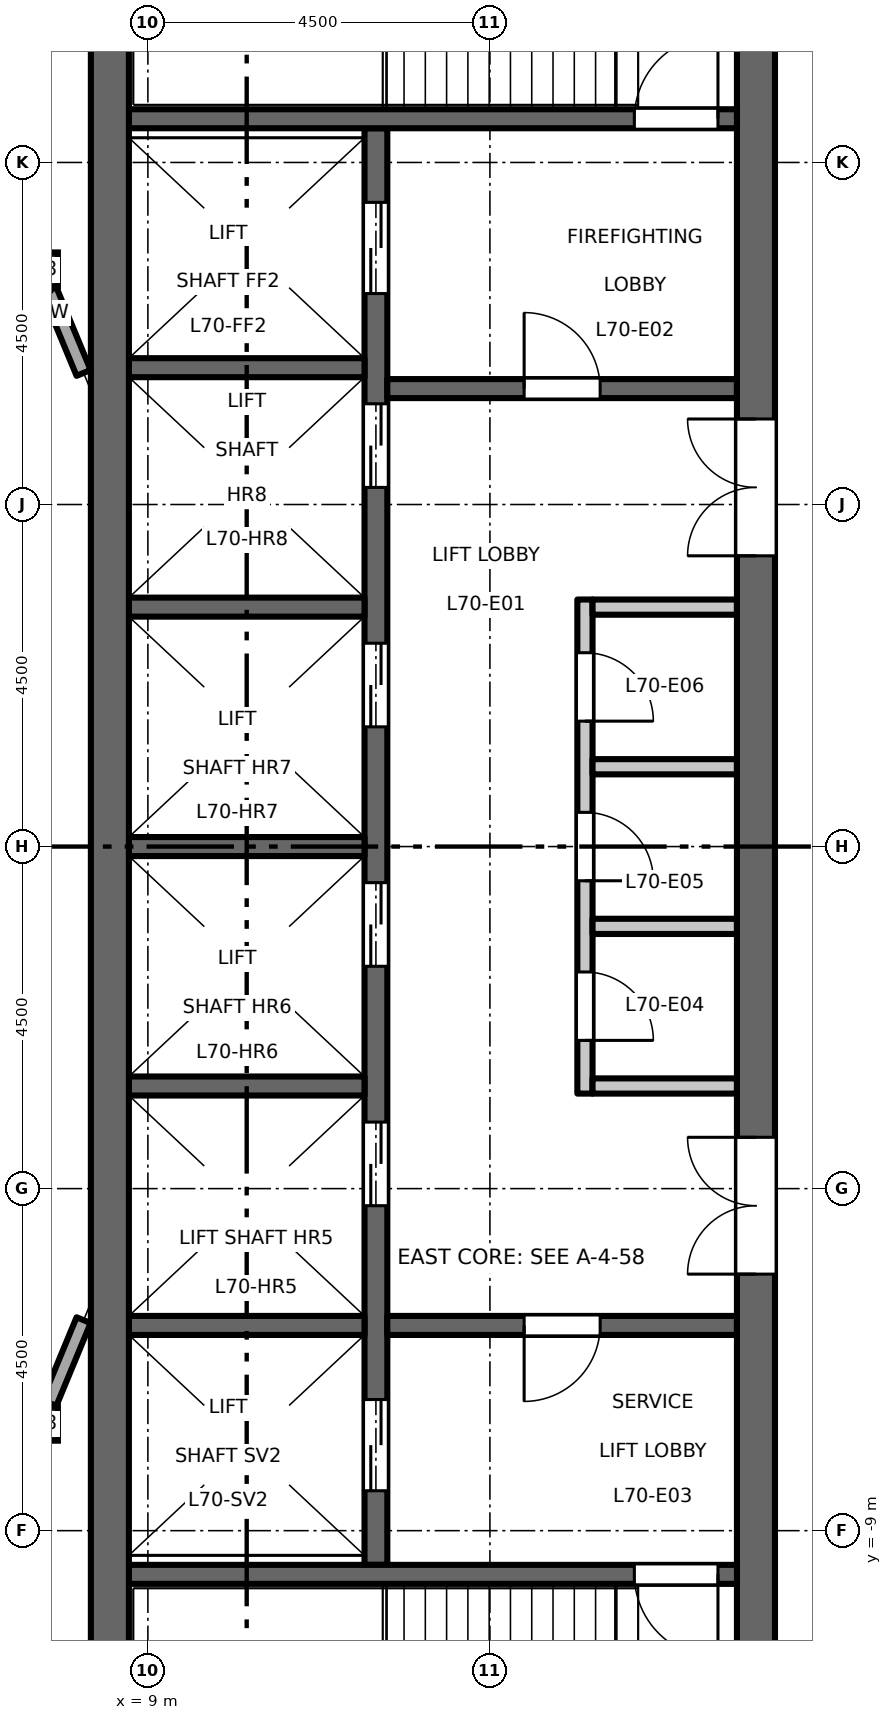
"""IFC4 building model, lengths in metres.
Left out: names, types, materials, properties, quantities, classifications, styles, units other than length and angle.
Written with IfcOpenShell. Run it as: python <this file> out.ifc"""

import sys

from ifc_helpers import new_model, si_unit, direction, frame, frame_2d, origin, origin_2d, place, context, subcontext, project, spatial, rectangle, hollow_rectangle, extrude, element, fill, save


model = new_model("IFC4")
c1 = context("Model", 3, precision=1e-05, world=origin(), true_north=direction((0.0, 1.0)))
c2 = subcontext(c1, "Body", "Model", "MODEL_VIEW")
j1 = project(units=[si_unit("LENGTHUNIT", "METRE"), si_unit("PLANEANGLEUNIT", "RADIAN")], contexts=[c1])
p1 = place(None, origin())
s1 = spatial("IfcSite", under=j1, at=p1, CompositionType="ELEMENT")
p2 = place(p1, origin())
s2 = spatial("IfcBuilding", under=s1, at=p2, CompositionType="ELEMENT")
p3 = place(p2, frame((0.0, 0.0, 325.7)))
s3 = spatial("IfcBuildingStorey", under=s2, at=p3, CompositionType="ELEMENT", Elevation=325.7)
for number, where, z_axis, x_axis in (
    (1, (7.591, -7.591, 0.0), (0.0, 0.0, 1.0), (1.0, 0.0, 0.0)),
    (2, (7.591, 7.591, 0.0), (0.0, 0.0, 1.0), (1.0, 0.0, 0.0)),
):
    element("IfcColumn", number, at=place(p3, frame(where, z_axis=z_axis, x_axis=x_axis)), inside=s3, PredefinedType="COLUMN", context=c2, shape_type="SweptSolid", body=[
        extrude(hollow_rectangle(XDim=0.45, YDim=0.45, WallThickness=0.022, at=origin_2d()), origin(), (0.0, 0.0, 1.0), 4.5),
    ])
p4 = place(p3, frame((14.75, -3.25, 0.0), z_axis=(0.0, 0.0, 1.0), x_axis=(0.0, 1.0, 0.0)))
e3 = element("IfcWall", 3, at=p4, inside=s3, PredefinedType="PARTITIONING", context=c2, shape_type="SweptSolid", body=[
    extrude(rectangle(XDim=6.5, YDim=0.2, at=frame_2d((3.25, 0.0))), origin(), (0.0, 0.0, 1.0), 4.35),
])
p5 = place(p4, frame((0.7, 0.0, 0.0)))
e4 = element("IfcOpeningElement", 4, at=p5, cuts=e3, PredefinedType="OPENING", context=c2, shape_type="SweptSolid", body=[
    extrude(rectangle(XDim=0.9, YDim=2.1, at=frame_2d((0.45, 1.05))), frame((0.0, 0.11, 0.0), z_axis=(0.0, -1.0, 0.0), x_axis=(1.0, 0.0, 0.0)), (0.0, 0.0, 1.0), 0.22),
])
p6 = place(p4, frame((2.8, 0.0, 0.0)))
e5 = element("IfcOpeningElement", 5, at=p6, cuts=e3, PredefinedType="OPENING", context=c2, shape_type="SweptSolid", body=[
    extrude(rectangle(XDim=0.9, YDim=2.1, at=frame_2d((0.45, 1.05))), frame((0.0, 0.11, 0.0), z_axis=(0.0, -1.0, 0.0), x_axis=(1.0, 0.0, 0.0)), (0.0, 0.0, 1.0), 0.22),
])
p7 = place(p4, frame((4.9, 0.0, 0.0)))
e6 = element("IfcOpeningElement", 6, at=p7, cuts=e3, PredefinedType="OPENING", context=c2, shape_type="SweptSolid", body=[
    extrude(rectangle(XDim=0.9, YDim=2.1, at=frame_2d((0.45, 1.05))), frame((0.0, 0.11, 0.0), z_axis=(0.0, -1.0, 0.0), x_axis=(1.0, 0.0, 0.0)), (0.0, 0.0, 1.0), 0.22),
])
for number, where, z_axis, x_axis in (
    (7, (14.85, 3.15, 0.0), (0.0, 0.0, 1.0), (1.0, 0.0, 0.0)),
    (8, (14.85, -3.15, 0.0), (0.0, 0.0, 1.0), (1.0, 0.0, 0.0)),
    (9, (14.85, -1.05, 0.0), (0.0, 0.0, 1.0), (1.0, 0.0, 0.0)),
    (10, (14.85, 1.05, 0.0), (0.0, 0.0, 1.0), (1.0, 0.0, 0.0)),
):
    element("IfcWall", number, at=place(p3, frame(where, z_axis=z_axis, x_axis=x_axis)), inside=s3, PredefinedType="PARTITIONING", context=c2, shape_type="SweptSolid", body=[
        extrude(rectangle(XDim=1.9, YDim=0.2, at=frame_2d((0.95, 0.0))), origin(), (0.0, 0.0, 1.0), 4.35),
    ])
p8 = place(p3, frame((12.0, -9.45, 0.0), z_axis=(0.0, 0.0, 1.0), x_axis=(0.0, 1.0, 0.0)))
e11 = element("IfcWall", 11, at=p8, inside=s3, PredefinedType="SHEAR", context=c2, shape_type="SweptSolid", body=[
    extrude(rectangle(XDim=18.9, YDim=0.3, at=frame_2d((9.45, 0.0))), origin(), (0.0, 0.0, 1.0), 4.35),
])
p9 = place(p8, frame((4.725, 0.0, 0.0)))
e12 = element("IfcOpeningElement", 12, at=p9, cuts=e11, PredefinedType="OPENING", context=c2, shape_type="SweptSolid", body=[
    extrude(rectangle(XDim=1.1, YDim=2.1, at=frame_2d((0.55, 1.05))), frame((0.0, 0.16, 0.0), z_axis=(0.0, -1.0, 0.0), x_axis=(1.0, 0.0, 0.0)), (0.0, 0.0, 1.0), 0.32),
])
p10 = place(p8, frame((7.875, 0.0, 0.0)))
e13 = element("IfcOpeningElement", 13, at=p10, cuts=e11, PredefinedType="OPENING", context=c2, shape_type="SweptSolid", body=[
    extrude(rectangle(XDim=1.1, YDim=2.1, at=frame_2d((0.55, 1.05))), frame((0.0, 0.16, 0.0), z_axis=(0.0, -1.0, 0.0), x_axis=(1.0, 0.0, 0.0)), (0.0, 0.0, 1.0), 0.32),
])
p11 = place(p8, frame((11.025, 0.0, 0.0)))
e14 = element("IfcOpeningElement", 14, at=p11, cuts=e11, PredefinedType="OPENING", context=c2, shape_type="SweptSolid", body=[
    extrude(rectangle(XDim=1.1, YDim=2.1, at=frame_2d((0.55, 1.05))), frame((0.0, 0.16, 0.0), z_axis=(0.0, -1.0, 0.0), x_axis=(1.0, 0.0, 0.0)), (0.0, 0.0, 1.0), 0.32),
])
p12 = place(p8, frame((14.175, 0.0, 0.0)))
e15 = element("IfcOpeningElement", 15, at=p12, cuts=e11, PredefinedType="OPENING", context=c2, shape_type="SweptSolid", body=[
    extrude(rectangle(XDim=1.1, YDim=2.1, at=frame_2d((0.55, 1.05))), frame((0.0, 0.16, 0.0), z_axis=(0.0, -1.0, 0.0), x_axis=(1.0, 0.0, 0.0)), (0.0, 0.0, 1.0), 0.32),
])
p13 = place(p8, frame((16.725, 0.0, 0.0)))
e16 = element("IfcOpeningElement", 16, at=p13, cuts=e11, PredefinedType="OPENING", context=c2, shape_type="SweptSolid", body=[
    extrude(rectangle(XDim=1.2, YDim=2.1, at=frame_2d((0.6, 1.05))), frame((0.0, 0.16, 0.0), z_axis=(0.0, -1.0, 0.0), x_axis=(1.0, 0.0, 0.0)), (0.0, 0.0, 1.0), 0.32),
])
p14 = place(p8, frame((0.975, 0.0, 0.0)))
e17 = element("IfcOpeningElement", 17, at=p14, cuts=e11, PredefinedType="OPENING", context=c2, shape_type="SweptSolid", body=[
    extrude(rectangle(XDim=1.2, YDim=2.1, at=frame_2d((0.6, 1.05))), frame((0.0, 0.16, 0.0), z_axis=(0.0, -1.0, 0.0), x_axis=(1.0, 0.0, 0.0)), (0.0, 0.0, 1.0), 0.32),
])
p15 = place(p3, frame((12.15, 6.025, 0.0), z_axis=(0.0, 0.0, 1.0), x_axis=(1.0, 0.0, 0.0)))
e18 = element("IfcWall", 18, at=p15, inside=s3, PredefinedType="SHEAR", context=c2, shape_type="SweptSolid", body=[
    extrude(rectangle(XDim=4.6, YDim=0.25, at=frame_2d((2.3, 0.0))), origin(), (0.0, 0.0, 1.0), 4.35),
])
p16 = place(p15, frame((1.8, 0.0, 0.0)))
e19 = element("IfcOpeningElement", 19, at=p16, cuts=e18, PredefinedType="OPENING", context=c2, shape_type="SweptSolid", body=[
    extrude(rectangle(XDim=1.0, YDim=2.1, at=frame_2d((0.5, 1.05))), frame((0.0, 0.135, 0.0), z_axis=(0.0, -1.0, 0.0), x_axis=(1.0, 0.0, 0.0)), (0.0, 0.0, 1.0), 0.27),
])
p17 = place(p3, frame((12.15, -6.3, 0.0), z_axis=(0.0, 0.0, 1.0), x_axis=(1.0, 0.0, 0.0)))
e20 = element("IfcWall", 20, at=p17, inside=s3, PredefinedType="SHEAR", context=c2, shape_type="SweptSolid", body=[
    extrude(rectangle(XDim=4.6, YDim=0.25, at=frame_2d((2.3, 0.0))), origin(), (0.0, 0.0, 1.0), 4.35),
])
p18 = place(p17, frame((1.8, 0.0, 0.0)))
e21 = element("IfcOpeningElement", 21, at=p18, cuts=e20, PredefinedType="OPENING", context=c2, shape_type="SweptSolid", body=[
    extrude(rectangle(XDim=1.0, YDim=2.1, at=frame_2d((0.5, 1.05))), frame((0.0, 0.135, 0.0), z_axis=(0.0, -1.0, 0.0), x_axis=(1.0, 0.0, 0.0)), (0.0, 0.0, 1.0), 0.27),
])
p19 = place(p3, frame((17.0, -13.0, 0.0), z_axis=(0.0, 0.0, 1.0), x_axis=(0.0, 1.0, 0.0)))
e22 = element("IfcWall", 22, at=p19, inside=s3, PredefinedType="SHEAR", context=c2, shape_type="SweptSolid", body=[
    extrude(rectangle(XDim=26.0, YDim=0.5, at=frame_2d((13.0, 0.0))), origin(), (0.0, 0.0, 1.0), 4.35),
])
p20 = place(p19, frame((16.825, 0.0, 0.0)))
e23 = element("IfcOpeningElement", 23, at=p20, cuts=e22, PredefinedType="OPENING", context=c2, shape_type="SweptSolid", body=[
    extrude(rectangle(XDim=1.8, YDim=2.1, at=frame_2d((0.9, 1.05))), frame((0.0, 0.26, 0.0), z_axis=(0.0, -1.0, 0.0), x_axis=(1.0, 0.0, 0.0)), (0.0, 0.0, 1.0), 0.52),
])
p21 = place(p19, frame((7.375, 0.0, 0.0)))
e24 = element("IfcOpeningElement", 24, at=p21, cuts=e22, PredefinedType="OPENING", context=c2, shape_type="SweptSolid", body=[
    extrude(rectangle(XDim=1.8, YDim=2.1, at=frame_2d((0.9, 1.05))), frame((0.0, 0.26, 0.0), z_axis=(0.0, -1.0, 0.0), x_axis=(1.0, 0.0, 0.0)), (0.0, 0.0, 1.0), 0.52),
])
for number, where, z_axis, x_axis in (
    (25, (8.75, 0.0, 0.0), (0.0, 0.0, 1.0), (1.0, 0.0, 0.0)),
    (26, (8.75, 3.15, 0.0), (0.0, 0.0, 1.0), (1.0, 0.0, 0.0)),
    (27, (8.75, 6.3, 0.0), (0.0, 0.0, 1.0), (1.0, 0.0, 0.0)),
    (28, (8.75, -3.15, 0.0), (0.0, 0.0, 1.0), (1.0, 0.0, 0.0)),
    (29, (8.75, -6.3, 0.0), (0.0, 0.0, 1.0), (1.0, 0.0, 0.0)),
):
    element("IfcWall", number, at=place(p3, frame(where, z_axis=z_axis, x_axis=x_axis)), inside=s3, PredefinedType="SHEAR", context=c2, shape_type="SweptSolid", body=[
        extrude(rectangle(XDim=3.1, YDim=0.25, at=frame_2d((1.55, 0.0))), origin(), (0.0, 0.0, 1.0), 4.35),
    ])
p22 = place(p3, frame((8.75, 9.575, 0.0), z_axis=(0.0, 0.0, 1.0), x_axis=(1.0, 0.0, 0.0)))
e30 = element("IfcWall", 30, at=p22, inside=s3, PredefinedType="SHEAR", context=c2, shape_type="SweptSolid", body=[
    extrude(rectangle(XDim=8.0, YDim=0.25, at=frame_2d((4.0, 0.0))), origin(), (0.0, 0.0, 1.0), 4.35),
])
p23 = place(p22, frame((6.65, 0.0, 0.0)))
e31 = element("IfcOpeningElement", 31, at=p23, cuts=e30, PredefinedType="OPENING", context=c2, shape_type="SweptSolid", body=[
    extrude(rectangle(XDim=1.1, YDim=2.1, at=frame_2d((0.55, 1.05))), frame((0.0, 0.135, 0.0), z_axis=(0.0, -1.0, 0.0), x_axis=(1.0, 0.0, 0.0)), (0.0, 0.0, 1.0), 0.27),
])
p24 = place(p3, frame((8.75, -9.575, 0.0), z_axis=(0.0, 0.0, 1.0), x_axis=(1.0, 0.0, 0.0)))
e32 = element("IfcWall", 32, at=p24, inside=s3, PredefinedType="SHEAR", context=c2, shape_type="SweptSolid", body=[
    extrude(rectangle(XDim=8.0, YDim=0.25, at=frame_2d((4.0, 0.0))), origin(), (0.0, 0.0, 1.0), 4.35),
])
p25 = place(p24, frame((6.65, 0.0, 0.0)))
e33 = element("IfcOpeningElement", 33, at=p25, cuts=e32, PredefinedType="OPENING", context=c2, shape_type="SweptSolid", body=[
    extrude(rectangle(XDim=1.1, YDim=2.1, at=frame_2d((0.55, 1.05))), frame((0.0, 0.135, 0.0), z_axis=(0.0, -1.0, 0.0), x_axis=(1.0, 0.0, 0.0)), (0.0, 0.0, 1.0), 0.27),
])
p26 = place(p3, frame((8.5, -13.0, 0.0), z_axis=(0.0, 0.0, 1.0), x_axis=(0.0, 1.0, 0.0)))
e34 = element("IfcWall", 34, at=p26, inside=s3, PredefinedType="SHEAR", context=c2, shape_type="SweptSolid", body=[
    extrude(rectangle(XDim=26.0, YDim=0.5, at=frame_2d((13.0, 0.0))), origin(), (0.0, 0.0, 1.0), 4.35),
])
for number, where, z_axis, x_axis in (
    (35, (7.703, -7.319, 0.0), (0.0, 0.0, 1.0), (0.383, 0.924, 0.0)),
    (36, (8.154, 6.231, 0.0), (0.0, 0.0, 1.0), (-0.383, 0.924, 0.0)),
):
    element("IfcWall", number, at=place(p3, frame(where, z_axis=z_axis, x_axis=x_axis)), inside=s3, PredefinedType="STANDARD", context=c2, shape_type="SweptSolid", body=[
        extrude(rectangle(XDim=1.178, YDim=0.2, at=frame_2d((0.589, 0.0))), origin(), (0.0, 0.0, 1.0), 4.01),
    ])
p27 = place(p16, origin())
e37 = element("IfcDoor", 37, at=p27, inside=s3, OperationType="SINGLE_SWING_RIGHT", PredefinedType="DOOR", context=c2, shape_type="SweptSolid", body=[
    extrude(rectangle(XDim=1.0, YDim=2.1, at=frame_2d((0.5, 1.05))), frame((0.0, 0.025, 0.0), z_axis=(0.0, -1.0, 0.0), x_axis=(1.0, 0.0, 0.0)), (0.0, 0.0, 1.0), 0.05),
])
fill(e19, e37)
p28 = place(p18, origin())
e38 = element("IfcDoor", 38, at=p28, inside=s3, OperationType="SINGLE_SWING_LEFT", PredefinedType="DOOR", context=c2, shape_type="SweptSolid", body=[
    extrude(rectangle(XDim=1.0, YDim=2.1, at=frame_2d((0.5, 1.05))), frame((0.0, 0.025, 0.0), z_axis=(0.0, -1.0, 0.0), x_axis=(1.0, 0.0, 0.0)), (0.0, 0.0, 1.0), 0.05),
])
fill(e21, e38)
p29 = place(p23, origin())
e39 = element("IfcDoor", 39, at=p29, inside=s3, OperationType="SINGLE_SWING_LEFT", PredefinedType="DOOR", context=c2, shape_type="SweptSolid", body=[
    extrude(rectangle(XDim=1.1, YDim=2.1, at=frame_2d((0.55, 1.05))), frame((0.0, 0.025, 0.0), z_axis=(0.0, -1.0, 0.0), x_axis=(1.0, 0.0, 0.0)), (0.0, 0.0, 1.0), 0.05),
])
fill(e31, e39)
p30 = place(p25, origin())
e40 = element("IfcDoor", 40, at=p30, inside=s3, OperationType="SINGLE_SWING_RIGHT", PredefinedType="DOOR", context=c2, shape_type="SweptSolid", body=[
    extrude(rectangle(XDim=1.1, YDim=2.1, at=frame_2d((0.55, 1.05))), frame((0.0, 0.025, 0.0), z_axis=(0.0, -1.0, 0.0), x_axis=(1.0, 0.0, 0.0)), (0.0, 0.0, 1.0), 0.05),
])
fill(e33, e40)
p31 = place(p20, origin())
e41 = element("IfcDoor", 41, at=p31, inside=s3, OperationType="DOUBLE_DOOR_DOUBLE_SWING", PredefinedType="DOOR", context=c2, shape_type="SweptSolid", body=[
    extrude(rectangle(XDim=1.8, YDim=2.1, at=frame_2d((0.9, 1.05))), frame((0.0, 0.025, 0.0), z_axis=(0.0, -1.0, 0.0), x_axis=(1.0, 0.0, 0.0)), (0.0, 0.0, 1.0), 0.05),
])
fill(e23, e41)
p32 = place(p21, origin())
e42 = element("IfcDoor", 42, at=p32, inside=s3, OperationType="DOUBLE_DOOR_DOUBLE_SWING", PredefinedType="DOOR", context=c2, shape_type="SweptSolid", body=[
    extrude(rectangle(XDim=1.8, YDim=2.1, at=frame_2d((0.9, 1.05))), frame((0.0, 0.025, 0.0), z_axis=(0.0, -1.0, 0.0), x_axis=(1.0, 0.0, 0.0)), (0.0, 0.0, 1.0), 0.05),
])
fill(e24, e42)
p33 = place(p9, origin())
e43 = element("IfcDoor", 43, at=p33, inside=s3, OperationType="DOUBLE_DOOR_SLIDING", PredefinedType="DOOR", context=c2, shape_type="SweptSolid", body=[
    extrude(rectangle(XDim=1.1, YDim=2.1, at=frame_2d((0.55, 1.05))), frame((0.0, 0.025, 0.0), z_axis=(0.0, -1.0, 0.0), x_axis=(1.0, 0.0, 0.0)), (0.0, 0.0, 1.0), 0.05),
])
fill(e12, e43)
p34 = place(p10, origin())
e44 = element("IfcDoor", 44, at=p34, inside=s3, OperationType="DOUBLE_DOOR_SLIDING", PredefinedType="DOOR", context=c2, shape_type="SweptSolid", body=[
    extrude(rectangle(XDim=1.1, YDim=2.1, at=frame_2d((0.55, 1.05))), frame((0.0, 0.025, 0.0), z_axis=(0.0, -1.0, 0.0), x_axis=(1.0, 0.0, 0.0)), (0.0, 0.0, 1.0), 0.05),
])
fill(e13, e44)
p35 = place(p11, origin())
e45 = element("IfcDoor", 45, at=p35, inside=s3, OperationType="DOUBLE_DOOR_SLIDING", PredefinedType="DOOR", context=c2, shape_type="SweptSolid", body=[
    extrude(rectangle(XDim=1.1, YDim=2.1, at=frame_2d((0.55, 1.05))), frame((0.0, 0.025, 0.0), z_axis=(0.0, -1.0, 0.0), x_axis=(1.0, 0.0, 0.0)), (0.0, 0.0, 1.0), 0.05),
])
fill(e14, e45)
p36 = place(p12, origin())
e46 = element("IfcDoor", 46, at=p36, inside=s3, OperationType="DOUBLE_DOOR_SLIDING", PredefinedType="DOOR", context=c2, shape_type="SweptSolid", body=[
    extrude(rectangle(XDim=1.1, YDim=2.1, at=frame_2d((0.55, 1.05))), frame((0.0, 0.025, 0.0), z_axis=(0.0, -1.0, 0.0), x_axis=(1.0, 0.0, 0.0)), (0.0, 0.0, 1.0), 0.05),
])
fill(e15, e46)
p37 = place(p13, origin())
e47 = element("IfcDoor", 47, at=p37, inside=s3, OperationType="DOUBLE_DOOR_SLIDING", PredefinedType="DOOR", context=c2, shape_type="SweptSolid", body=[
    extrude(rectangle(XDim=1.2, YDim=2.1, at=frame_2d((0.6, 1.05))), frame((0.0, 0.025, 0.0), z_axis=(0.0, -1.0, 0.0), x_axis=(1.0, 0.0, 0.0)), (0.0, 0.0, 1.0), 0.05),
])
fill(e16, e47)
p38 = place(p14, origin())
e48 = element("IfcDoor", 48, at=p38, inside=s3, OperationType="DOUBLE_DOOR_SLIDING", PredefinedType="DOOR", context=c2, shape_type="SweptSolid", body=[
    extrude(rectangle(XDim=1.2, YDim=2.1, at=frame_2d((0.6, 1.05))), frame((0.0, 0.025, 0.0), z_axis=(0.0, -1.0, 0.0), x_axis=(1.0, 0.0, 0.0)), (0.0, 0.0, 1.0), 0.05),
])
fill(e17, e48)
p39 = place(p5, origin())
e49 = element("IfcDoor", 49, at=p39, inside=s3, OperationType="SINGLE_SWING_LEFT", PredefinedType="DOOR", context=c2, shape_type="SweptSolid", body=[
    extrude(rectangle(XDim=0.9, YDim=2.1, at=frame_2d((0.45, 1.05))), frame((0.0, 0.025, 0.0), z_axis=(0.0, -1.0, 0.0), x_axis=(1.0, 0.0, 0.0)), (0.0, 0.0, 1.0), 0.05),
])
fill(e4, e49)
p40 = place(p6, origin())
e50 = element("IfcDoor", 50, at=p40, inside=s3, OperationType="SINGLE_SWING_LEFT", PredefinedType="DOOR", context=c2, shape_type="SweptSolid", body=[
    extrude(rectangle(XDim=0.9, YDim=2.1, at=frame_2d((0.45, 1.05))), frame((0.0, 0.025, 0.0), z_axis=(0.0, -1.0, 0.0), x_axis=(1.0, 0.0, 0.0)), (0.0, 0.0, 1.0), 0.05),
])
fill(e5, e50)
p41 = place(p7, origin())
e51 = element("IfcDoor", 51, at=p41, inside=s3, OperationType="SINGLE_SWING_LEFT", PredefinedType="DOOR", context=c2, shape_type="SweptSolid", body=[
    extrude(rectangle(XDim=0.9, YDim=2.1, at=frame_2d((0.45, 1.05))), frame((0.0, 0.025, 0.0), z_axis=(0.0, -1.0, 0.0), x_axis=(1.0, 0.0, 0.0)), (0.0, 0.0, 1.0), 0.05),
])
fill(e6, e51)
save(model, sys.argv[1])
